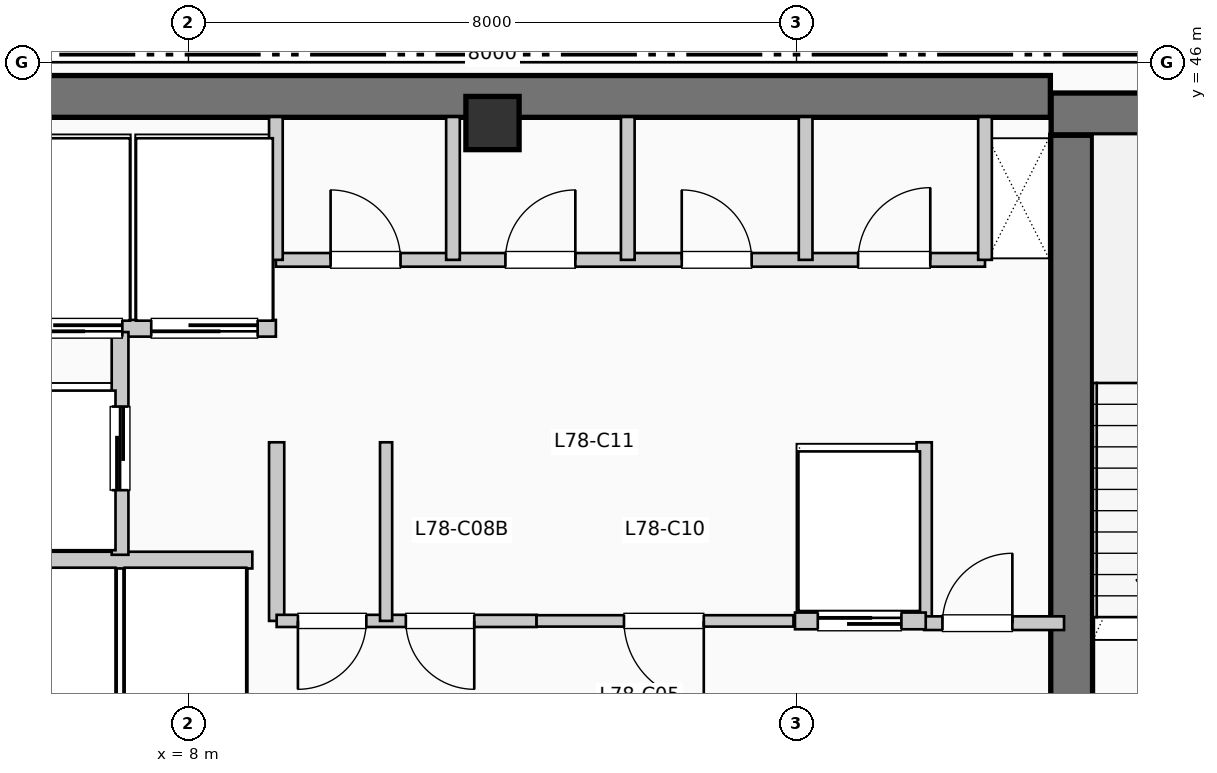
"""IFC4 building model, lengths in metres.
Left out: names, types, materials, properties, quantities, classifications, styles, units other than length and angle.
Written with IfcOpenShell. Run it as: python <this file> out.ifc"""

import sys

from ifc_helpers import new_model, si_unit, direction, frame, frame_2d, origin, origin_2d, place, context, subcontext, project, spatial, rectangle, extrude, element, fill, save


model = new_model("IFC4")
c1 = context("Model", 3, precision=1e-05, world=origin(), true_north=direction((0.0, 1.0)))
c2 = subcontext(c1, "Body", "Model", "MODEL_VIEW")
j1 = project(units=[si_unit("LENGTHUNIT", "METRE"), si_unit("PLANEANGLEUNIT", "RADIAN")], contexts=[c1])
p1 = place(None, origin())
s1 = spatial("IfcSite", under=j1, at=p1, CompositionType="ELEMENT")
p2 = place(p1, origin())
s2 = spatial("IfcBuilding", under=s1, at=p2, CompositionType="ELEMENT")
p3 = place(p2, frame((0.0, 0.0, 319.77)))
s3 = spatial("IfcBuildingStorey", under=s2, at=p3, CompositionType="ELEMENT", Elevation=319.77)
p4 = place(p3, frame((5.36, 45.55, 0.0), z_axis=(0.0, 0.0, 1.0), x_axis=(1.0, 0.0, 0.0)))
e1 = element("IfcWall", 1, at=p4, inside=s3, PredefinedType="SHEAR", context=c2, shape_type="SweptSolid", body=[
    extrude(rectangle(XDim=13.98, YDim=0.55, at=frame_2d((6.99, 0.0))), origin(), (0.0, 0.0, 1.0), 3.96),
])
p5 = place(p3, frame((19.62, 37.15, 0.0), z_axis=(0.0, 0.0, 1.0), x_axis=(0.0, 1.0, 0.0)))
e2 = element("IfcWall", 2, at=p5, inside=s3, PredefinedType="SHEAR", context=c2, shape_type="SweptSolid", body=[
    extrude(rectangle(XDim=7.89, YDim=0.55, at=frame_2d((3.945, 0.0))), origin(), (0.0, 0.0, 1.0), 3.96),
])
p6 = place(p3, frame((19.35, 45.32, 0.0), z_axis=(0.0, 0.0, 1.0), x_axis=(1.0, 0.0, 0.0)))
e3 = element("IfcWall", 3, at=p6, inside=s3, PredefinedType="SHEAR", context=c2, shape_type="SweptSolid", body=[
    extrude(rectangle(XDim=3.69, YDim=0.55, at=frame_2d((1.845, 0.0))), origin(), (0.0, 0.0, 1.0), 3.96),
])
p7 = place(p6, frame((1.15, 0.0, 1.05)))
e4 = element("IfcOpeningElement", 4, at=p7, cuts=e3, PredefinedType="OPENING", context=c2, shape_type="SweptSolid", body=[
    extrude(rectangle(XDim=1.4, YDim=1.8, at=frame_2d((0.7, 0.9))), frame((0.0, 0.285, 0.0), z_axis=(0.0, -1.0, 0.0), x_axis=(1.0, 0.0, 0.0)), (0.0, 0.0, 1.0), 0.57),
])
p8 = place(p3, frame((12.0, 45.2, 0.0), z_axis=(0.0, 0.0, 1.0), x_axis=(1.0, 0.0, 0.0)))
e5 = element("IfcColumn", 5, at=p8, inside=s3, PredefinedType="COLUMN", context=c2, shape_type="SweptSolid", body=[
    extrude(rectangle(XDim=0.7, YDim=0.7, at=origin_2d()), origin(), (0.0, 0.0, 1.0), 3.96),
])
p9 = place(p3, frame((5.38, 39.45, 0.0), z_axis=(0.0, 0.0, 1.0), x_axis=(1.0, 0.0, 0.0)))
e6 = element("IfcWall", 6, at=p9, inside=s3, PredefinedType="PARTITIONING", context=c2, shape_type="SweptSolid", body=[
    extrude(rectangle(XDim=3.46, YDim=0.22, at=frame_2d((1.73, 0.0))), origin(), (0.0, 0.0, 1.0), 3.74),
])
p10 = place(p3, frame((5.38, 42.5, 0.0), z_axis=(0.0, 0.0, 1.0), x_axis=(1.0, 0.0, 0.0)))
e7 = element("IfcWall", 7, at=p10, inside=s3, PredefinedType="PARTITIONING", context=c2, shape_type="SweptSolid", body=[
    extrude(rectangle(XDim=3.77, YDim=0.22, at=frame_2d((1.885, 0.0))), origin(), (0.0, 0.0, 1.0), 3.74),
])
p11 = place(p10, frame((1.75, 0.0, 0.0), z_axis=(0.0, 0.0, 1.0), x_axis=(-1.0, 0.0, 0.0)))
e8 = element("IfcOpeningElement", 8, at=p11, cuts=e7, PredefinedType="OPENING", context=c2, shape_type="SweptSolid", body=[
    extrude(rectangle(XDim=1.4, YDim=2.2, at=frame_2d((0.7, 1.1))), frame((0.0, 0.12, 0.0), z_axis=(0.0, -1.0, 0.0), x_axis=(1.0, 0.0, 0.0)), (0.0, 0.0, 1.0), 0.24),
])
p12 = place(p10, frame((3.53, 0.0, 0.0), z_axis=(0.0, 0.0, 1.0), x_axis=(-1.0, 0.0, 0.0)))
e9 = element("IfcOpeningElement", 9, at=p12, cuts=e7, PredefinedType="OPENING", context=c2, shape_type="SweptSolid", body=[
    extrude(rectangle(XDim=1.4, YDim=2.2, at=frame_2d((0.7, 1.1))), frame((0.0, 0.12, 0.0), z_axis=(0.0, -1.0, 0.0), x_axis=(1.0, 0.0, 0.0)), (0.0, 0.0, 1.0), 0.24),
])
p13 = place(p3, frame((7.1, 39.52, 0.0), z_axis=(0.0, 0.0, 1.0), x_axis=(0.0, 1.0, 0.0)))
e10 = element("IfcWall", 10, at=p13, inside=s3, PredefinedType="PARTITIONING", context=c2, shape_type="SweptSolid", body=[
    extrude(rectangle(XDim=2.93, YDim=0.22, at=frame_2d((1.465, 0.0))), origin(), (0.0, 0.0, 1.0), 3.74),
])
p14 = place(p13, frame((0.85, 0.0, 0.0)))
e11 = element("IfcOpeningElement", 11, at=p14, cuts=e10, PredefinedType="OPENING", context=c2, shape_type="SweptSolid", body=[
    extrude(rectangle(XDim=1.1, YDim=2.2, at=frame_2d((0.55, 1.1))), frame((0.0, 0.12, 0.0), z_axis=(0.0, -1.0, 0.0), x_axis=(1.0, 0.0, 0.0)), (0.0, 0.0, 1.0), 0.24),
])
for number, where, z_axis, x_axis in (
    (12, (9.16, 38.65, 0.0), (0.0, 0.0, 1.0), (0.0, 1.0, 0.0)),
    (13, (17.68, 38.65, 0.0), (0.0, 0.0, 1.0), (0.0, 1.0, 0.0)),
):
    element("IfcWall", number, at=place(p3, frame(where, z_axis=z_axis, x_axis=x_axis)), inside=s3, PredefinedType="PARTITIONING", context=c2, shape_type="SweptSolid", body=[
        extrude(rectangle(XDim=2.35, YDim=0.2, at=frame_2d((1.175, 0.0))), origin(), (0.0, 0.0, 1.0), 3.74),
    ])
p15 = place(p3, frame((17.68, 38.62, 0.0), z_axis=(0.0, 0.0, 1.0), x_axis=(1.0, 0.0, 0.0)))
e14 = element("IfcWall", 14, at=p15, inside=s3, PredefinedType="PARTITIONING", context=c2, shape_type="SweptSolid", body=[
    extrude(rectangle(XDim=1.84, YDim=0.18, at=frame_2d((0.92, 0.0))), origin(), (0.0, 0.0, 1.0), 3.74),
])
p16 = place(p15, frame((0.24, 0.0, 0.0)))
e15 = element("IfcOpeningElement", 15, at=p16, cuts=e14, PredefinedType="OPENING", context=c2, shape_type="SweptSolid", body=[
    extrude(rectangle(XDim=0.92, YDim=2.1, at=frame_2d((0.46, 1.05))), frame((0.0, 0.1, 0.0), z_axis=(0.0, -1.0, 0.0), x_axis=(1.0, 0.0, 0.0)), (0.0, 0.0, 1.0), 0.2),
])
p17 = place(p3, frame((9.16, 38.65, 0.0), z_axis=(0.0, 0.0, 1.0), x_axis=(1.0, 0.0, 0.0)))
e16 = element("IfcWall", 16, at=p17, inside=s3, PredefinedType="PARTITIONING", context=c2, shape_type="SweptSolid", body=[
    extrude(rectangle(XDim=3.42, YDim=0.16, at=frame_2d((1.71, 0.0))), origin(), (0.0, 0.0, 1.0), 3.74),
])
p18 = place(p17, frame((1.18, 0.0, 0.0), z_axis=(0.0, 0.0, 1.0), x_axis=(-1.0, 0.0, 0.0)))
e17 = element("IfcOpeningElement", 17, at=p18, cuts=e16, PredefinedType="OPENING", context=c2, shape_type="SweptSolid", body=[
    extrude(rectangle(XDim=0.9, YDim=2.15, at=frame_2d((0.45, 1.075))), frame((0.0, 0.09, 0.0), z_axis=(0.0, -1.0, 0.0), x_axis=(1.0, 0.0, 0.0)), (0.0, 0.0, 1.0), 0.18),
])
p19 = place(p17, frame((2.6, 0.0, 0.0), z_axis=(0.0, 0.0, 1.0), x_axis=(-1.0, 0.0, 0.0)))
e18 = element("IfcOpeningElement", 18, at=p19, cuts=e16, PredefinedType="OPENING", context=c2, shape_type="SweptSolid", body=[
    extrude(rectangle(XDim=0.9, YDim=2.15, at=frame_2d((0.45, 1.075))), frame((0.0, 0.09, 0.0), z_axis=(0.0, -1.0, 0.0), x_axis=(1.0, 0.0, 0.0)), (0.0, 0.0, 1.0), 0.18),
])
p20 = place(p3, frame((10.6, 38.65, 0.0), z_axis=(0.0, 0.0, 1.0), x_axis=(0.0, 1.0, 0.0)))
e19 = element("IfcWall", 19, at=p20, inside=s3, PredefinedType="PARTITIONING", context=c2, shape_type="SweptSolid", body=[
    extrude(rectangle(XDim=2.35, YDim=0.16, at=frame_2d((1.175, 0.0))), origin(), (0.0, 0.0, 1.0), 3.74),
])
p21 = place(p3, frame((12.58, 38.65, 0.0), z_axis=(0.0, 0.0, 1.0), x_axis=(1.0, 0.0, 0.0)))
e20 = element("IfcWall", 20, at=p21, inside=s3, PredefinedType="PARTITIONING", context=c2, shape_type="SweptSolid", body=[
    extrude(rectangle(XDim=3.38, YDim=0.15, at=frame_2d((1.69, 0.0))), origin(), (0.0, 0.0, 1.0), 3.74),
])
p22 = place(p21, frame((2.2, 0.0, 0.0), z_axis=(0.0, 0.0, 1.0), x_axis=(-1.0, 0.0, 0.0)))
e21 = element("IfcOpeningElement", 21, at=p22, cuts=e20, PredefinedType="OPENING", context=c2, shape_type="SweptSolid", body=[
    extrude(rectangle(XDim=1.05, YDim=2.15, at=frame_2d((0.525, 1.075))), frame((0.0, 0.085, 0.0), z_axis=(0.0, -1.0, 0.0), x_axis=(1.0, 0.0, 0.0)), (0.0, 0.0, 1.0), 0.17),
])
p23 = place(p3, frame((15.98, 38.65, 0.0), z_axis=(0.0, 0.0, 1.0), x_axis=(1.0, 0.0, 0.0)))
e22 = element("IfcWall", 22, at=p23, inside=s3, PredefinedType="PARTITIONING", context=c2, shape_type="SweptSolid", body=[
    extrude(rectangle(XDim=1.72, YDim=0.22, at=frame_2d((0.86, 0.0))), origin(), (0.0, 0.0, 1.0), 3.74),
])
p24 = place(p23, frame((0.3, 0.0, 0.0)))
e23 = element("IfcOpeningElement", 23, at=p24, cuts=e22, PredefinedType="OPENING", context=c2, shape_type="SweptSolid", body=[
    extrude(rectangle(XDim=1.1, YDim=2.2, at=frame_2d((0.55, 1.1))), frame((0.0, 0.12, 0.0), z_axis=(0.0, -1.0, 0.0), x_axis=(1.0, 0.0, 0.0)), (0.0, 0.0, 1.0), 0.24),
])
p25 = place(p3, frame((9.15, 43.4, 0.0), z_axis=(0.0, 0.0, 1.0), x_axis=(1.0, 0.0, 0.0)))
e24 = element("IfcWall", 24, at=p25, inside=s3, PredefinedType="PLUMBINGWALL", context=c2, shape_type="SweptSolid", body=[
    extrude(rectangle(XDim=9.33, YDim=0.18, at=frame_2d((4.665, 0.0))), origin(), (0.0, 0.0, 1.0), 3.74),
])
p26 = place(p25, frame((0.72, 0.0, 0.0)))
e25 = element("IfcOpeningElement", 25, at=p26, cuts=e24, PredefinedType="OPENING", context=c2, shape_type="SweptSolid", body=[
    extrude(rectangle(XDim=0.92, YDim=2.1, at=frame_2d((0.46, 1.05))), frame((0.0, 0.1, 0.0), z_axis=(0.0, -1.0, 0.0), x_axis=(1.0, 0.0, 0.0)), (0.0, 0.0, 1.0), 0.2),
])
p27 = place(p25, frame((3.02, 0.0, 0.0)))
e26 = element("IfcOpeningElement", 26, at=p27, cuts=e24, PredefinedType="OPENING", context=c2, shape_type="SweptSolid", body=[
    extrude(rectangle(XDim=0.92, YDim=2.1, at=frame_2d((0.46, 1.05))), frame((0.0, 0.1, 0.0), z_axis=(0.0, -1.0, 0.0), x_axis=(1.0, 0.0, 0.0)), (0.0, 0.0, 1.0), 0.2),
])
p28 = place(p25, frame((5.34, 0.0, 0.0)))
e27 = element("IfcOpeningElement", 27, at=p28, cuts=e24, PredefinedType="OPENING", context=c2, shape_type="SweptSolid", body=[
    extrude(rectangle(XDim=0.92, YDim=2.1, at=frame_2d((0.46, 1.05))), frame((0.0, 0.1, 0.0), z_axis=(0.0, -1.0, 0.0), x_axis=(1.0, 0.0, 0.0)), (0.0, 0.0, 1.0), 0.2),
])
p29 = place(p25, frame((7.66, 0.0, 0.0)))
e28 = element("IfcOpeningElement", 28, at=p29, cuts=e24, PredefinedType="OPENING", context=c2, shape_type="SweptSolid", body=[
    extrude(rectangle(XDim=0.95, YDim=2.1, at=frame_2d((0.475, 1.05))), frame((0.0, 0.1, 0.0), z_axis=(0.0, -1.0, 0.0), x_axis=(1.0, 0.0, 0.0)), (0.0, 0.0, 1.0), 0.2),
])
for number, where, z_axis, x_axis in (
    (29, (9.15, 43.4, 0.0), (0.0, 0.0, 1.0), (0.0, 1.0, 0.0)),
    (30, (18.48, 43.4, 0.0), (0.0, 0.0, 1.0), (0.0, 1.0, 0.0)),
    (31, (11.48, 43.4, 0.0), (0.0, 0.0, 1.0), (0.0, 1.0, 0.0)),
    (32, (13.78, 43.4, 0.0), (0.0, 0.0, 1.0), (0.0, 1.0, 0.0)),
    (33, (16.12, 43.4, 0.0), (0.0, 0.0, 1.0), (0.0, 1.0, 0.0)),
):
    element("IfcWall", number, at=place(p3, frame(where, z_axis=z_axis, x_axis=x_axis)), inside=s3, PredefinedType="PLUMBINGWALL", context=c2, shape_type="SweptSolid", body=[
        extrude(rectangle(XDim=1.88, YDim=0.18, at=frame_2d((0.94, 0.0))), origin(), (0.0, 0.0, 1.0), 3.74),
    ])
p30 = place(p11, origin())
e34 = element("IfcDoor", 34, at=p30, inside=s3, OperationType="SLIDING_TO_LEFT", PredefinedType="DOOR", context=c2, shape_type="SweptSolid", body=[
    extrude(rectangle(XDim=1.4, YDim=2.2, at=frame_2d((0.7, 1.1))), frame((0.0, 0.025, 0.0), z_axis=(0.0, -1.0, 0.0), x_axis=(1.0, 0.0, 0.0)), (0.0, 0.0, 1.0), 0.05),
])
fill(e8, e34)
p31 = place(p12, origin())
e35 = element("IfcDoor", 35, at=p31, inside=s3, OperationType="SLIDING_TO_LEFT", PredefinedType="DOOR", context=c2, shape_type="SweptSolid", body=[
    extrude(rectangle(XDim=1.4, YDim=2.2, at=frame_2d((0.7, 1.1))), frame((0.0, 0.025, 0.0), z_axis=(0.0, -1.0, 0.0), x_axis=(1.0, 0.0, 0.0)), (0.0, 0.0, 1.0), 0.05),
])
fill(e9, e35)
p32 = place(p14, origin())
e36 = element("IfcDoor", 36, at=p32, inside=s3, OperationType="SLIDING_TO_LEFT", PredefinedType="DOOR", context=c2, shape_type="SweptSolid", body=[
    extrude(rectangle(XDim=1.1, YDim=2.2, at=frame_2d((0.55, 1.1))), frame((0.0, 0.025, 0.0), z_axis=(0.0, -1.0, 0.0), x_axis=(1.0, 0.0, 0.0)), (0.0, 0.0, 1.0), 0.05),
])
fill(e11, e36)
p33 = place(p16, origin())
e37 = element("IfcDoor", 37, at=p33, inside=s3, OperationType="SINGLE_SWING_RIGHT", PredefinedType="DOOR", context=c2, shape_type="SweptSolid", body=[
    extrude(rectangle(XDim=0.92, YDim=2.1, at=frame_2d((0.46, 1.05))), frame((0.0, 0.025, 0.0), z_axis=(0.0, -1.0, 0.0), x_axis=(1.0, 0.0, 0.0)), (0.0, 0.0, 1.0), 0.05),
])
fill(e15, e37)
p34 = place(p18, origin())
e38 = element("IfcDoor", 38, at=p34, inside=s3, OperationType="SINGLE_SWING_LEFT", PredefinedType="DOOR", context=c2, shape_type="SweptSolid", body=[
    extrude(rectangle(XDim=0.9, YDim=2.15, at=frame_2d((0.45, 1.075))), frame((0.0, 0.025, 0.0), z_axis=(0.0, -1.0, 0.0), x_axis=(1.0, 0.0, 0.0)), (0.0, 0.0, 1.0), 0.05),
])
fill(e17, e38)
p35 = place(p19, origin())
e39 = element("IfcDoor", 39, at=p35, inside=s3, OperationType="SINGLE_SWING_RIGHT", PredefinedType="DOOR", context=c2, shape_type="SweptSolid", body=[
    extrude(rectangle(XDim=0.9, YDim=2.15, at=frame_2d((0.45, 1.075))), frame((0.0, 0.025, 0.0), z_axis=(0.0, -1.0, 0.0), x_axis=(1.0, 0.0, 0.0)), (0.0, 0.0, 1.0), 0.05),
])
fill(e18, e39)
p36 = place(p22, origin())
e40 = element("IfcDoor", 40, at=p36, inside=s3, OperationType="SINGLE_SWING_RIGHT", PredefinedType="DOOR", context=c2, shape_type="SweptSolid", body=[
    extrude(rectangle(XDim=1.05, YDim=2.15, at=frame_2d((0.525, 1.075))), frame((0.0, 0.025, 0.0), z_axis=(0.0, -1.0, 0.0), x_axis=(1.0, 0.0, 0.0)), (0.0, 0.0, 1.0), 0.05),
])
fill(e21, e40)
p37 = place(p24, origin())
e41 = element("IfcDoor", 41, at=p37, inside=s3, OperationType="SLIDING_TO_LEFT", PredefinedType="DOOR", context=c2, shape_type="SweptSolid", body=[
    extrude(rectangle(XDim=1.1, YDim=2.2, at=frame_2d((0.55, 1.1))), frame((0.0, 0.025, 0.0), z_axis=(0.0, -1.0, 0.0), x_axis=(1.0, 0.0, 0.0)), (0.0, 0.0, 1.0), 0.05),
])
fill(e23, e41)
p38 = place(p26, origin())
e42 = element("IfcDoor", 42, at=p38, inside=s3, OperationType="SINGLE_SWING_LEFT", PredefinedType="DOOR", context=c2, shape_type="SweptSolid", body=[
    extrude(rectangle(XDim=0.92, YDim=2.1, at=frame_2d((0.46, 1.05))), frame((0.0, 0.025, 0.0), z_axis=(0.0, -1.0, 0.0), x_axis=(1.0, 0.0, 0.0)), (0.0, 0.0, 1.0), 0.05),
])
fill(e25, e42)
p39 = place(p27, origin())
e43 = element("IfcDoor", 43, at=p39, inside=s3, OperationType="SINGLE_SWING_RIGHT", PredefinedType="DOOR", context=c2, shape_type="SweptSolid", body=[
    extrude(rectangle(XDim=0.92, YDim=2.1, at=frame_2d((0.46, 1.05))), frame((0.0, 0.025, 0.0), z_axis=(0.0, -1.0, 0.0), x_axis=(1.0, 0.0, 0.0)), (0.0, 0.0, 1.0), 0.05),
])
fill(e26, e43)
p40 = place(p28, origin())
e44 = element("IfcDoor", 44, at=p40, inside=s3, OperationType="SINGLE_SWING_LEFT", PredefinedType="DOOR", context=c2, shape_type="SweptSolid", body=[
    extrude(rectangle(XDim=0.92, YDim=2.1, at=frame_2d((0.46, 1.05))), frame((0.0, 0.025, 0.0), z_axis=(0.0, -1.0, 0.0), x_axis=(1.0, 0.0, 0.0)), (0.0, 0.0, 1.0), 0.05),
])
fill(e27, e44)
p41 = place(p29, origin())
e45 = element("IfcDoor", 45, at=p41, inside=s3, OperationType="SINGLE_SWING_RIGHT", PredefinedType="DOOR", context=c2, shape_type="SweptSolid", body=[
    extrude(rectangle(XDim=0.95, YDim=2.1, at=frame_2d((0.475, 1.05))), frame((0.0, 0.025, 0.0), z_axis=(0.0, -1.0, 0.0), x_axis=(1.0, 0.0, 0.0)), (0.0, 0.0, 1.0), 0.05),
])
fill(e28, e45)
save(model, sys.argv[1])
